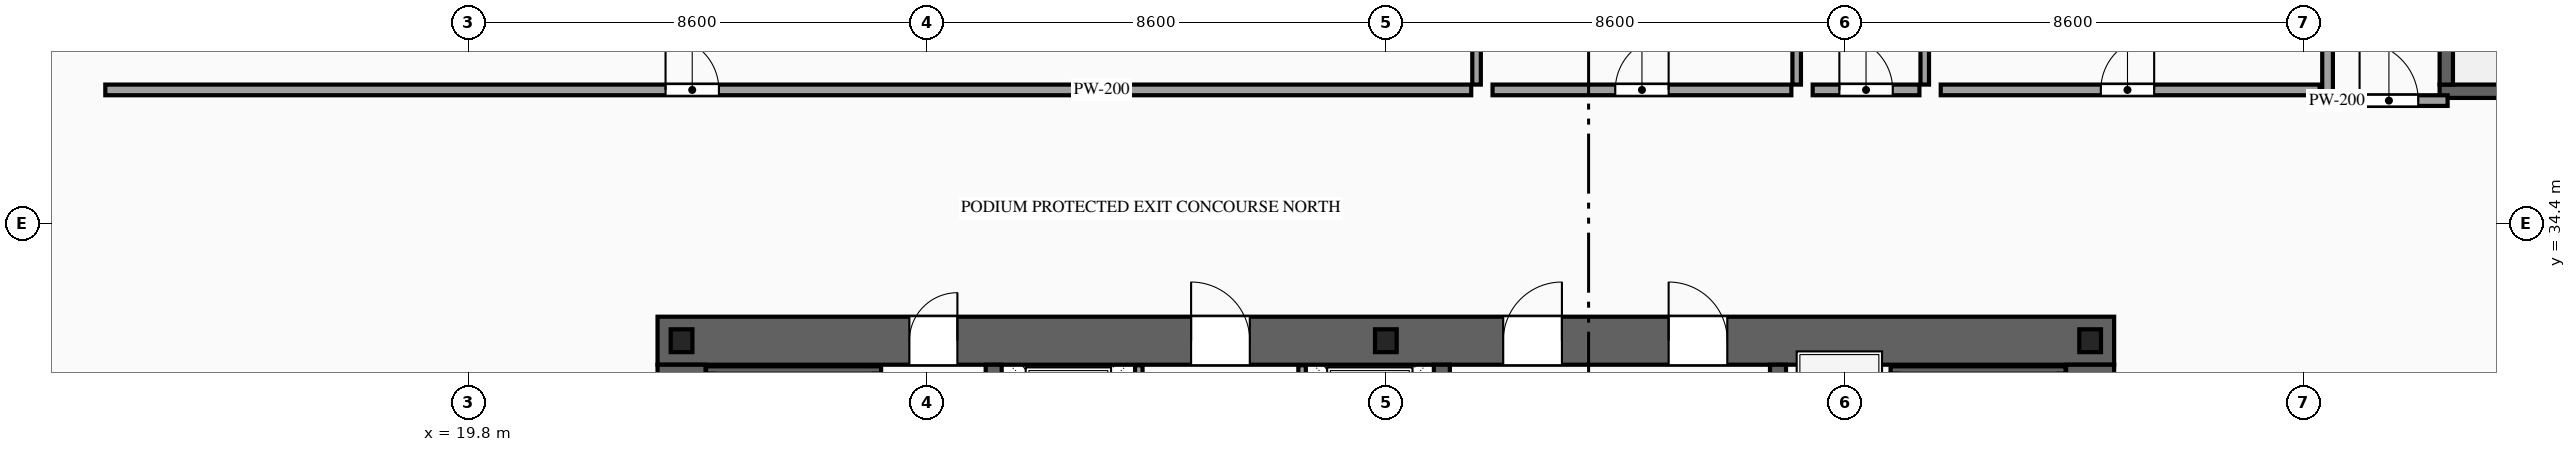
"""IFC4 building model, lengths in metres.
Left out: names, types, materials, properties, quantities, classifications, styles, units other than length and angle.
Written with IfcOpenShell. Run it as: python <this file> out.ifc"""

import sys

from ifc_helpers import new_model, si_unit, direction, frame, frame_2d, origin, origin_2d, place, context, subcontext, project, spatial, rectangle, i_section, extrude, source, transform, mapped, element, fill, save


model = new_model("IFC4")
c1 = context("Model", 3, precision=1e-05, world=origin(), true_north=direction((0.0, 1.0)))
c2 = subcontext(c1, "Body", "Model", "MODEL_VIEW")
j1 = project(units=[si_unit("LENGTHUNIT", "METRE"), si_unit("PLANEANGLEUNIT", "RADIAN")], contexts=[c1])
p1 = place(None, origin())
s1 = spatial("IfcSite", under=j1, at=p1, CompositionType="ELEMENT")
p2 = place(p1, origin())
s2 = spatial("IfcBuilding", under=s1, at=p2, CompositionType="ELEMENT")
p3 = place(p2, origin())
s3 = spatial("IfcBuildingStorey", under=s2, at=p3, CompositionType="ELEMENT", Elevation=0.0)
p4 = place(p3, frame((23.35, 32.2, 0.0), z_axis=(0.0, 0.0, 1.0), x_axis=(1.0, 0.0, 0.0)))
e1 = element("IfcWall", 1, at=p4, inside=s3, PredefinedType="SHEAR", context=c2, shape_type="SweptSolid", body=[
    extrude(rectangle(XDim=27.3, YDim=0.9, at=frame_2d((13.65, 0.0))), origin(), (0.0, 0.0, 1.0), 5.4),
])
p5 = place(p4, frame((4.72, 0.0, 0.0)))
e2 = element("IfcOpeningElement", 2, at=p5, cuts=e1, PredefinedType="OPENING", context=c2, shape_type="SweptSolid", body=[
    extrude(rectangle(XDim=0.9, YDim=2.15, at=frame_2d((0.45, 1.075))), frame((0.0, 0.465, 0.0), z_axis=(0.0, -1.0, 0.0), x_axis=(1.0, 0.0, 0.0)), (0.0, 0.0, 1.0), 0.93),
])
p6 = place(p4, frame((10.0, 0.0, 0.0)))
e3 = element("IfcOpeningElement", 3, at=p6, cuts=e1, PredefinedType="OPENING", context=c2, shape_type="SweptSolid", body=[
    extrude(rectangle(XDim=1.1, YDim=2.2, at=frame_2d((0.55, 1.1))), frame((0.0, 0.465, 0.0), z_axis=(0.0, -1.0, 0.0), x_axis=(1.0, 0.0, 0.0)), (0.0, 0.0, 1.0), 0.93),
])
p7 = place(p4, frame((15.85, 0.0, 0.0)))
e4 = element("IfcOpeningElement", 4, at=p7, cuts=e1, PredefinedType="OPENING", context=c2, shape_type="SweptSolid", body=[
    extrude(rectangle(XDim=1.1, YDim=2.2, at=frame_2d((0.55, 1.1))), frame((0.0, 0.465, 0.0), z_axis=(0.0, -1.0, 0.0), x_axis=(1.0, 0.0, 0.0)), (0.0, 0.0, 1.0), 0.93),
])
p8 = place(p4, frame((18.95, 0.0, 0.0)))
e5 = element("IfcOpeningElement", 5, at=p8, cuts=e1, PredefinedType="OPENING", context=c2, shape_type="SweptSolid", body=[
    extrude(rectangle(XDim=1.1, YDim=2.2, at=frame_2d((0.55, 1.1))), frame((0.0, 0.465, 0.0), z_axis=(0.0, -1.0, 0.0), x_axis=(1.0, 0.0, 0.0)), (0.0, 0.0, 1.0), 0.93),
])
m1 = source(origin(), c2, "Body", "SweptSolid", [
    extrude(rectangle(XDim=11.9, YDim=0.9, at=frame_2d((5.95, 0.0))), origin(), (0.0, 0.0, 1.0), 5.4),
])
for number, where, z_axis, x_axis in (
    (6, (23.8, 19.85, 0.0), (0.0, 0.0, 1.0), (0.0, 1.0, 0.0)),
    (7, (50.2, 19.85, 0.0), (0.0, 0.0, 1.0), (0.0, 1.0, 0.0)),
):
    element("IfcWall", number, at=place(p3, frame(where, z_axis=z_axis, x_axis=x_axis)), inside=s3, PredefinedType="SHEAR", context=c2, shape_type="MappedRepresentation", body=[
        mapped(m1, transform((0.0, 0.0, 0.0), scale=1.0)),
    ])
m2 = source(origin(), c2, "Body", "SweptSolid", [
    extrude(rectangle(XDim=11.9, YDim=0.3, at=frame_2d((5.95, 0.0))), origin(), (0.0, 0.0, 1.0), 5.4),
])
for number, where, z_axis, x_axis in (
    (8, (29.65, 19.85, 0.0), (0.0, 0.0, 1.0), (0.0, 1.0, 0.0)),
    (9, (38.05, 19.85, 0.0), (0.0, 0.0, 1.0), (0.0, 1.0, 0.0)),
):
    element("IfcWall", number, at=place(p3, frame(where, z_axis=z_axis, x_axis=x_axis)), inside=s3, PredefinedType="SOLIDWALL", context=c2, shape_type="MappedRepresentation", body=[
        mapped(m2, transform((0.0, 0.0, 0.0), scale=1.0)),
    ])
p9 = place(p3, frame((44.35, 19.85, 0.0), z_axis=(0.0, 0.0, 1.0), x_axis=(0.0, 1.0, 0.0)))
e10 = element("IfcWall", 10, at=p9, inside=s3, PredefinedType="SOLIDWALL", context=c2, shape_type="SweptSolid", body=[
    extrude(rectangle(XDim=11.9, YDim=0.3, at=frame_2d((5.95, 0.0))), origin(), (0.0, 0.0, 1.0), 5.4),
])
p10 = place(p9, frame((6.35, 0.0, 0.0)))
e11 = element("IfcOpeningElement", 11, at=p10, cuts=e10, PredefinedType="OPENING", context=c2, shape_type="SweptSolid", body=[
    extrude(rectangle(XDim=1.1, YDim=2.2, at=frame_2d((0.55, 1.1))), frame((0.0, 0.165, 0.0), z_axis=(0.0, -1.0, 0.0), x_axis=(1.0, 0.0, 0.0)), (0.0, 0.0, 1.0), 0.33),
])
p11 = place(p9, frame((8.45, 0.0, 0.0)))
e12 = element("IfcOpeningElement", 12, at=p11, cuts=e10, PredefinedType="OPENING", context=c2, shape_type="SweptSolid", body=[
    extrude(rectangle(XDim=1.1, YDim=2.2, at=frame_2d((0.55, 1.1))), frame((0.0, 0.165, 0.0), z_axis=(0.0, -1.0, 0.0), x_axis=(1.0, 0.0, 0.0)), (0.0, 0.0, 1.0), 0.33),
])
p12 = place(p9, frame((10.55, 0.0, 0.0)))
e13 = element("IfcOpeningElement", 13, at=p12, cuts=e10, PredefinedType="OPENING", context=c2, shape_type="SweptSolid", body=[
    extrude(rectangle(XDim=1.1, YDim=2.2, at=frame_2d((0.55, 1.1))), frame((0.0, 0.165, 0.0), z_axis=(0.0, -1.0, 0.0), x_axis=(1.0, 0.0, 0.0)), (0.0, 0.0, 1.0), 0.33),
])
m3 = source(origin(), c2, "Body", "SweptSolid", [
    extrude(i_section(OverallWidth=0.407, OverallDepth=0.428, WebThickness=0.02, FlangeThickness=0.035, at=origin_2d()), origin(), (0.0, 0.0, 1.0), 5.4),
])
for number, where, z_axis, x_axis in (
    (14, (23.8, 32.2, 0.0), (0.0, 0.0, 1.0), (1.0, 0.0, 0.0)),
    (15, (37.0, 32.2, 0.0), (0.0, 0.0, 1.0), (1.0, 0.0, 0.0)),
    (16, (50.2, 32.2, 0.0), (0.0, 0.0, 1.0), (1.0, 0.0, 0.0)),
):
    element("IfcColumn", number, at=place(p3, frame(where, z_axis=z_axis, x_axis=x_axis)), inside=s3, PredefinedType="COLUMN", context=c2, shape_type="MappedRepresentation", body=[
        mapped(m3, transform((0.0, 0.0, 0.0), scale=1.0)),
    ])
p13 = place(p3, frame((32.37, 29.4, 0.0), z_axis=(0.0, 0.0, 1.0), x_axis=(0.0, 1.0, 0.0)))
e17 = element("IfcWall", 17, at=p13, inside=s3, PredefinedType="SOLIDWALL", context=c2, shape_type="SweptSolid", body=[
    extrude(rectangle(XDim=2.34, YDim=0.14, at=frame_2d((1.17, 0.0))), origin(), (0.0, 0.0, 1.0), 5.12),
])
p14 = place(p13, frame((0.62, 0.0, 0.0)))
e18 = element("IfcOpeningElement", 18, at=p14, cuts=e17, PredefinedType="OPENING", context=c2, shape_type="SweptSolid", body=[
    extrude(rectangle(XDim=1.1, YDim=2.2, at=frame_2d((0.55, 1.1))), frame((0.0, 0.085, 0.0), z_axis=(0.0, -1.0, 0.0), x_axis=(1.0, 0.0, 0.0)), (0.0, 0.0, 1.0), 0.17),
])
p15 = place(p3, frame((35.43, 29.4, 0.0), z_axis=(0.0, 0.0, 1.0), x_axis=(0.0, 1.0, 0.0)))
e19 = element("IfcWall", 19, at=p15, inside=s3, PredefinedType="SOLIDWALL", context=c2, shape_type="SweptSolid", body=[
    extrude(rectangle(XDim=2.34, YDim=0.14, at=frame_2d((1.17, 0.0))), origin(), (0.0, 0.0, 1.0), 5.12),
])
p16 = place(p15, frame((0.62, 0.0, 0.0)))
e20 = element("IfcOpeningElement", 20, at=p16, cuts=e19, PredefinedType="OPENING", context=c2, shape_type="SweptSolid", body=[
    extrude(rectangle(XDim=1.1, YDim=2.2, at=frame_2d((0.55, 1.1))), frame((0.0, 0.085, 0.0), z_axis=(0.0, -1.0, 0.0), x_axis=(1.0, 0.0, 0.0)), (0.0, 0.0, 1.0), 0.17),
])
m4 = source(origin(), c2, "Body", "SweptSolid", [
    extrude(rectangle(XDim=3.28, YDim=0.14, at=frame_2d((1.64, 0.0))), origin(), (0.0, 0.0, 1.0), 5.12),
])
for number, where, z_axis, x_axis in (
    (21, (24.26, 31.65, 0.0), (0.0, 0.0, 1.0), (1.0, 0.0, 0.0)),
    (22, (46.46, 31.65, 0.0), (0.0, 0.0, 1.0), (1.0, 0.0, 0.0)),
):
    element("IfcWall", number, at=place(p3, frame(where, z_axis=z_axis, x_axis=x_axis)), inside=s3, PredefinedType="SOLIDWALL", context=c2, shape_type="MappedRepresentation", body=[
        mapped(m4, transform((0.0, 0.0, 0.0), scale=1.0)),
    ])
m5 = source(origin(), c2, "Body", "SweptSolid", [
    extrude(rectangle(XDim=4.3, YDim=0.25, at=frame_2d((2.15, 0.0))), origin(), (0.0, 0.0, 1.0), 5.12),
])
p17 = place(p3, frame((56.75, 36.875, 0.0), z_axis=(0.0, 0.0, 1.0), x_axis=(1.0, 0.0, 0.0)))
e23 = element("IfcWall", 23, at=p17, inside=s3, PredefinedType="SOLIDWALL", context=c2, shape_type="MappedRepresentation", body=[
    mapped(m5, transform((0.0, 0.0, 0.0), scale=1.0)),
])
p18 = place(p3, frame((56.875, 37.0, 0.0), z_axis=(0.0, 0.0, 1.0), x_axis=(0.0, 1.0, 0.0)))
e24 = element("IfcWall", 24, at=p18, inside=s3, PredefinedType="SOLIDWALL", context=c2, shape_type="SweptSolid", body=[
    extrude(rectangle(XDim=9.6, YDim=0.25, at=frame_2d((4.8, 0.0))), origin(), (0.0, 0.0, 1.0), 5.12),
])
p19 = place(p18, frame((8.15, 0.0, 0.0)))
e25 = element("IfcOpeningElement", 25, at=p19, cuts=e24, PredefinedType="OPENING", context=c2, shape_type="SweptSolid", body=[
    extrude(rectangle(XDim=1.1, YDim=2.2, at=frame_2d((0.55, 1.1))), frame((0.0, 0.14, 0.0), z_axis=(0.0, -1.0, 0.0), x_axis=(1.0, 0.0, 0.0)), (0.0, 0.0, 1.0), 0.28),
])
p20 = place(p3, frame((54.65, 36.7, 0.0), z_axis=(0.0, 0.0, 1.0), x_axis=(1.0, 0.0, 0.0)))
e26 = element("IfcWall", 26, at=p20, inside=s3, PredefinedType="PARTITIONING", context=c2, shape_type="SweptSolid", body=[
    extrude(rectangle(XDim=2.25, YDim=0.2, at=frame_2d((1.125, 0.0))), origin(), (0.0, 0.0, 1.0), 5.12),
])
p21 = place(p20, frame((0.6, 0.0, 0.0)))
e27 = element("IfcOpeningElement", 27, at=p21, cuts=e26, PredefinedType="OPENING", context=c2, shape_type="SweptSolid", body=[
    extrude(rectangle(XDim=1.1, YDim=2.2, at=frame_2d((0.55, 1.1))), frame((0.0, 0.115, 0.0), z_axis=(0.0, -1.0, 0.0), x_axis=(1.0, 0.0, 0.0)), (0.0, 0.0, 1.0), 0.23),
])
m6 = source(origin(), c2, "Body", "SweptSolid", [
    extrude(rectangle(XDim=12.82, YDim=0.2, at=frame_2d((6.41, 0.0))), origin(), (0.0, 0.0, 1.0), 5.12),
])
p22 = place(p3, frame((54.65, 36.8, 0.0), z_axis=(0.0, 0.0, 1.0), x_axis=(0.0, 1.0, 0.0)))
e28 = element("IfcWall", 28, at=p22, inside=s3, PredefinedType="PARTITIONING", context=c2, shape_type="MappedRepresentation", body=[
    mapped(m6, transform((0.0, 0.0, 0.0), scale=1.0)),
])
p23 = place(p3, frame((13.0, 36.9, 0.0), z_axis=(0.0, 0.0, 1.0), x_axis=(1.0, 0.0, 0.0)))
e29 = element("IfcWall", 29, at=p23, inside=s3, PredefinedType="PARTITIONING", context=c2, shape_type="SweptSolid", body=[
    extrude(rectangle(XDim=25.6, YDim=0.2, at=frame_2d((12.8, 0.0))), origin(), (0.0, 0.0, 1.0), 5.12),
])
p24 = place(p23, frame((10.5, 0.0, 0.0)))
e30 = element("IfcOpeningElement", 30, at=p24, cuts=e29, PredefinedType="OPENING", context=c2, shape_type="SweptSolid", body=[
    extrude(rectangle(XDim=1.0, YDim=2.2, at=frame_2d((0.5, 1.1))), frame((0.0, 0.115, 0.0), z_axis=(0.0, -1.0, 0.0), x_axis=(1.0, 0.0, 0.0)), (0.0, 0.0, 1.0), 0.23),
])
m7 = source(origin(), c2, "Body", "SweptSolid", [
    extrude(rectangle(XDim=12.62, YDim=0.16, at=frame_2d((6.31, 0.0))), origin(), (0.0, 0.0, 1.0), 5.12),
])
p25 = place(p3, frame((38.7, 37.0, 0.0), z_axis=(0.0, 0.0, 1.0), x_axis=(0.0, 1.0, 0.0)))
e31 = element("IfcWall", 31, at=p25, inside=s3, PredefinedType="PARTITIONING", context=c2, shape_type="MappedRepresentation", body=[
    mapped(m7, transform((0.0, 0.0, 0.0), scale=1.0)),
])
p26 = place(p3, frame((39.0, 36.9, 0.0), z_axis=(0.0, 0.0, 1.0), x_axis=(1.0, 0.0, 0.0)))
e32 = element("IfcWall", 32, at=p26, inside=s3, PredefinedType="PARTITIONING", context=c2, shape_type="SweptSolid", body=[
    extrude(rectangle(XDim=5.6, YDim=0.2, at=frame_2d((2.8, 0.0))), origin(), (0.0, 0.0, 1.0), 5.12),
])
p27 = place(p26, frame((2.3, 0.0, 0.0)))
e33 = element("IfcOpeningElement", 33, at=p27, cuts=e32, PredefinedType="OPENING", context=c2, shape_type="SweptSolid", body=[
    extrude(rectangle(XDim=1.0, YDim=2.2, at=frame_2d((0.5, 1.1))), frame((0.0, 0.115, 0.0), z_axis=(0.0, -1.0, 0.0), x_axis=(1.0, 0.0, 0.0)), (0.0, 0.0, 1.0), 0.23),
])
p28 = place(p3, frame((44.7, 37.0, 0.0), z_axis=(0.0, 0.0, 1.0), x_axis=(0.0, 1.0, 0.0)))
e34 = element("IfcWall", 34, at=p28, inside=s3, PredefinedType="PARTITIONING", context=c2, shape_type="MappedRepresentation", body=[
    mapped(m7, transform((0.0, 0.0, 0.0), scale=1.0)),
])
p29 = place(p3, frame((45.0, 36.9, 0.0), z_axis=(0.0, 0.0, 1.0), x_axis=(1.0, 0.0, 0.0)))
e35 = element("IfcWall", 35, at=p29, inside=s3, PredefinedType="PARTITIONING", context=c2, shape_type="SweptSolid", body=[
    extrude(rectangle(XDim=2.0, YDim=0.2, at=frame_2d((1.0, 0.0))), origin(), (0.0, 0.0, 1.0), 5.12),
])
p30 = place(p29, frame((0.5, 0.0, 0.0)))
e36 = element("IfcOpeningElement", 36, at=p30, cuts=e35, PredefinedType="OPENING", context=c2, shape_type="SweptSolid", body=[
    extrude(rectangle(XDim=1.0, YDim=2.2, at=frame_2d((0.5, 1.1))), frame((0.0, 0.115, 0.0), z_axis=(0.0, -1.0, 0.0), x_axis=(1.0, 0.0, 0.0)), (0.0, 0.0, 1.0), 0.23),
])
p31 = place(p3, frame((47.1, 37.0, 0.0), z_axis=(0.0, 0.0, 1.0), x_axis=(0.0, 1.0, 0.0)))
e37 = element("IfcWall", 37, at=p31, inside=s3, PredefinedType="PARTITIONING", context=c2, shape_type="MappedRepresentation", body=[
    mapped(m7, transform((0.0, 0.0, 0.0), scale=1.0)),
])
p32 = place(p3, frame((47.4, 36.9, 0.0), z_axis=(0.0, 0.0, 1.0), x_axis=(1.0, 0.0, 0.0)))
e38 = element("IfcWall", 38, at=p32, inside=s3, PredefinedType="PARTITIONING", context=c2, shape_type="SweptSolid", body=[
    extrude(rectangle(XDim=7.1, YDim=0.2, at=frame_2d((3.55, 0.0))), origin(), (0.0, 0.0, 1.0), 5.12),
])
p33 = place(p32, frame((3.0, 0.0, 0.0)))
e39 = element("IfcOpeningElement", 39, at=p33, cuts=e38, PredefinedType="OPENING", context=c2, shape_type="SweptSolid", body=[
    extrude(rectangle(XDim=1.0, YDim=2.2, at=frame_2d((0.5, 1.1))), frame((0.0, 0.115, 0.0), z_axis=(0.0, -1.0, 0.0), x_axis=(1.0, 0.0, 0.0)), (0.0, 0.0, 1.0), 0.23),
])
m8 = source(origin(), c2, "Body", "SweptSolid", [
    extrude(rectangle(XDim=0.9, YDim=2.15, at=frame_2d((0.45, 1.075))), frame((0.0, 0.025, 0.0), z_axis=(0.0, -1.0, 0.0), x_axis=(1.0, 0.0, 0.0)), (0.0, 0.0, 1.0), 0.05),
])
p34 = place(p5, origin())
e40 = element("IfcDoor", 40, at=p34, inside=s3, OperationType="SINGLE_SWING_RIGHT", PredefinedType="DOOR", context=c2, shape_type="MappedRepresentation", body=[
    mapped(m8, transform((0.0, 0.0, 0.0), scale=1.0)),
])
fill(e2, e40)
m9 = source(origin(), c2, "Body", "SweptSolid", [
    extrude(rectangle(XDim=1.1, YDim=2.2, at=frame_2d((0.55, 1.1))), frame((0.0, 0.025, 0.0), z_axis=(0.0, -1.0, 0.0), x_axis=(1.0, 0.0, 0.0)), (0.0, 0.0, 1.0), 0.05),
])
p35 = place(p6, origin())
e41 = element("IfcDoor", 41, at=p35, inside=s3, OperationType="SINGLE_SWING_LEFT", PredefinedType="DOOR", context=c2, shape_type="MappedRepresentation", body=[
    mapped(m9, transform((0.0, 0.0, 0.0), scale=1.0)),
])
fill(e3, e41)
p36 = place(p7, origin())
e42 = element("IfcDoor", 42, at=p36, inside=s3, OperationType="SINGLE_SWING_RIGHT", PredefinedType="DOOR", context=c2, shape_type="MappedRepresentation", body=[
    mapped(m9, transform((0.0, 0.0, 0.0), scale=1.0)),
])
fill(e4, e42)
p37 = place(p8, origin())
e43 = element("IfcDoor", 43, at=p37, inside=s3, OperationType="SINGLE_SWING_LEFT", PredefinedType="DOOR", context=c2, shape_type="MappedRepresentation", body=[
    mapped(m9, transform((0.0, 0.0, 0.0), scale=1.0)),
])
fill(e5, e43)
p38 = place(p21, origin())
e44 = element("IfcDoor", 44, at=p38, inside=s3, OperationType="SINGLE_SWING_LEFT", PredefinedType="DOOR", context=c2, shape_type="MappedRepresentation", body=[
    mapped(m9, transform((0.0, 0.0, 0.0), scale=1.0)),
])
fill(e27, e44)
m10 = source(origin(), c2, "Body", "SweptSolid", [
    extrude(rectangle(XDim=1.0, YDim=2.2, at=frame_2d((0.5, 1.1))), frame((0.0, 0.025, 0.0), z_axis=(0.0, -1.0, 0.0), x_axis=(1.0, 0.0, 0.0)), (0.0, 0.0, 1.0), 0.05),
])
p39 = place(p24, origin())
e45 = element("IfcDoor", 45, at=p39, inside=s3, OperationType="SINGLE_SWING_LEFT", PredefinedType="DOOR", context=c2, shape_type="MappedRepresentation", body=[
    mapped(m10, transform((0.0, 0.0, 0.0), scale=1.0)),
])
fill(e30, e45)
p40 = place(p27, origin())
e46 = element("IfcDoor", 46, at=p40, inside=s3, OperationType="SINGLE_SWING_RIGHT", PredefinedType="DOOR", context=c2, shape_type="MappedRepresentation", body=[
    mapped(m10, transform((0.0, 0.0, 0.0), scale=1.0)),
])
fill(e33, e46)
p41 = place(p30, origin())
e47 = element("IfcDoor", 47, at=p41, inside=s3, OperationType="SINGLE_SWING_LEFT", PredefinedType="DOOR", context=c2, shape_type="MappedRepresentation", body=[
    mapped(m10, transform((0.0, 0.0, 0.0), scale=1.0)),
])
fill(e36, e47)
p42 = place(p33, origin())
e48 = element("IfcDoor", 48, at=p42, inside=s3, OperationType="SINGLE_SWING_RIGHT", PredefinedType="DOOR", context=c2, shape_type="MappedRepresentation", body=[
    mapped(m10, transform((0.0, 0.0, 0.0), scale=1.0)),
])
fill(e39, e48)
save(model, sys.argv[1])
